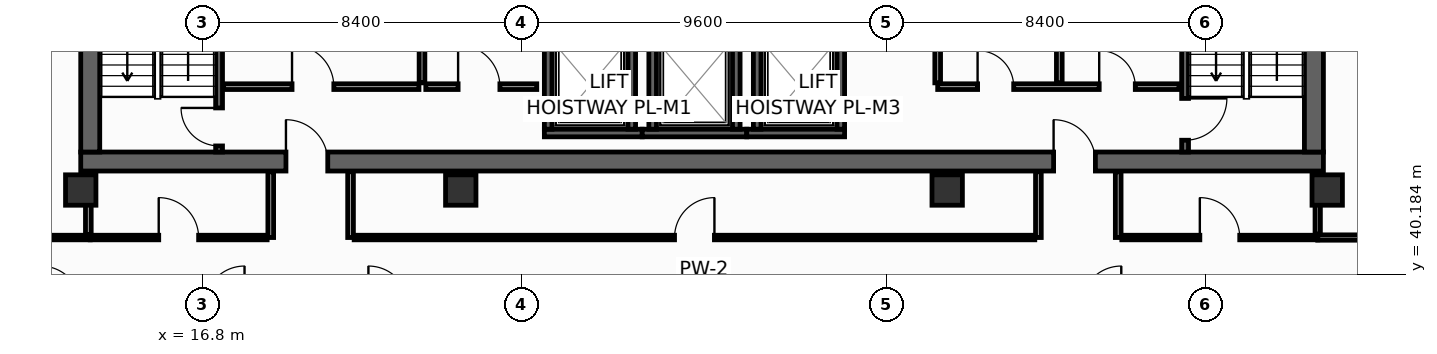
"""IFC4 building model, lengths in metres.
Left out: names, types, materials, properties, quantities, classifications, styles, units other than length and angle.
Written with IfcOpenShell. Run it as: python <this file> out.ifc"""

import sys

from ifc_helpers import new_model, si_unit, direction, frame, frame_2d, origin, origin_2d, place, context, subcontext, project, spatial, rectangle, hollow_rectangle, extrude, element, fill, save


model = new_model("IFC4")
c1 = context("Model", 3, precision=1e-05, world=origin(), true_north=direction((0.0, 1.0)))
c2 = subcontext(c1, "Body", "Model", "MODEL_VIEW")
j1 = project(units=[si_unit("LENGTHUNIT", "METRE"), si_unit("PLANEANGLEUNIT", "RADIAN")], contexts=[c1])
p1 = place(None, origin())
s1 = spatial("IfcSite", under=j1, at=p1, CompositionType="ELEMENT")
p2 = place(p1, origin())
s2 = spatial("IfcBuilding", under=s1, at=p2, CompositionType="ELEMENT")
p3 = place(p2, frame((0.0, 0.0, 194.2)))
s3 = spatial("IfcBuildingStorey", under=s2, at=p3, CompositionType="ELEMENT", Elevation=194.2)
p4 = place(p3, frame((13.6, 43.15, 0.0), z_axis=(0.0, 0.0, 1.0), x_axis=(1.0, 0.0, 0.0)))
e1 = element("IfcWall", 1, at=p4, inside=s3, PredefinedType="SHEAR", context=c2, shape_type="SweptSolid", body=[
    extrude(rectangle(XDim=32.7, YDim=0.5, at=frame_2d((16.35, 0.0))), origin(), (0.0, 0.0, 1.0), 3.55),
])
p5 = place(p4, frame((5.4, 0.0, 0.0)))
e2 = element("IfcOpeningElement", 2, at=p5, cuts=e1, PredefinedType="OPENING", context=c2, shape_type="SweptSolid", body=[
    extrude(rectangle(XDim=1.1, YDim=2.15, at=frame_2d((0.55, 1.075))), frame((0.0, 0.26, 0.0), z_axis=(0.0, -1.0, 0.0), x_axis=(1.0, 0.0, 0.0)), (0.0, 0.0, 1.0), 0.52),
])
p6 = place(p4, frame((25.6, 0.0, 0.0)))
e3 = element("IfcOpeningElement", 3, at=p6, cuts=e1, PredefinedType="OPENING", context=c2, shape_type="SweptSolid", body=[
    extrude(rectangle(XDim=1.1, YDim=2.15, at=frame_2d((0.55, 1.075))), frame((0.0, 0.26, 0.0), z_axis=(0.0, -1.0, 0.0), x_axis=(1.0, 0.0, 0.0)), (0.0, 0.0, 1.0), 0.52),
])
for number, where, z_axis, x_axis in (
    (4, (13.85, 43.4, 0.0), (0.0, 0.0, 1.0), (0.0, 1.0, 0.0)),
    (5, (46.05, 43.4, 0.0), (0.0, 0.0, 1.0), (0.0, 1.0, 0.0)),
):
    element("IfcWall", number, at=place(p3, frame(where, z_axis=z_axis, x_axis=x_axis)), inside=s3, PredefinedType="SHEAR", context=c2, shape_type="SweptSolid", body=[
        extrude(rectangle(XDim=10.4, YDim=0.5, at=frame_2d((5.2, 0.0))), origin(), (0.0, 0.0, 1.0), 3.55),
    ])
for number, where, z_axis, x_axis in (
    (6, (13.6, 42.4, 0.0), (0.0, 0.0, 1.0), (1.0, 0.0, 0.0)),
    (7, (23.6, 42.4, 0.0), (0.0, 0.0, 1.0), (1.0, 0.0, 0.0)),
    (8, (36.4, 42.4, 0.0), (0.0, 0.0, 1.0), (1.0, 0.0, 0.0)),
    (9, (46.4, 42.4, 0.0), (0.0, 0.0, 1.0), (1.0, 0.0, 0.0)),
):
    element("IfcColumn", number, at=place(p3, frame(where, z_axis=z_axis, x_axis=x_axis)), inside=s3, PredefinedType="COLUMN", context=c2, shape_type="SweptSolid", body=[
        extrude(hollow_rectangle(XDim=0.8, YDim=0.8, WallThickness=0.036, at=origin_2d()), origin(), (0.0, 0.0, 1.0), 3.8),
    ])
p7 = place(p3, frame((25.8, 43.9, 0.0), z_axis=(0.0, 0.0, 1.0), x_axis=(1.0, 0.0, 0.0)))
e10 = element("IfcWall", 10, at=p7, inside=s3, PredefinedType="SHEAR", context=c2, shape_type="SweptSolid", body=[
    extrude(rectangle(XDim=2.575, YDim=0.2, at=frame_2d((1.288, 0.0))), origin(), (0.0, 0.0, 1.0), 3.55),
])
for number, where, z_axis, x_axis in (
    (11, (25.9, 44.0, 0.0), (0.0, 0.0, 1.0), (0.0, 1.0, 0.0)),
    (12, (28.1, 44.0, 0.0), (0.0, 0.0, 1.0), (0.0, 1.0, 0.0)),
):
    element("IfcWall", number, at=place(p3, frame(where, z_axis=z_axis, x_axis=x_axis)), inside=s3, PredefinedType="SHEAR", context=c2, shape_type="SweptSolid", body=[
        extrude(rectangle(XDim=2.3, YDim=0.2, at=frame_2d((1.15, 0.0))), origin(), (0.0, 0.0, 1.0), 3.55),
    ])
p8 = place(p3, frame((28.375, 43.9, 0.0), z_axis=(0.0, 0.0, 1.0), x_axis=(1.0, 0.0, 0.0)))
e13 = element("IfcWall", 13, at=p8, inside=s3, PredefinedType="SHEAR", context=c2, shape_type="SweptSolid", body=[
    extrude(rectangle(XDim=2.75, YDim=0.2, at=frame_2d((1.375, 0.0))), origin(), (0.0, 0.0, 1.0), 3.55),
])
for number, where, z_axis, x_axis in (
    (14, (28.65, 44.0, 0.0), (0.0, 0.0, 1.0), (0.0, 1.0, 0.0)),
    (15, (30.85, 44.0, 0.0), (0.0, 0.0, 1.0), (0.0, 1.0, 0.0)),
):
    element("IfcWall", number, at=place(p3, frame(where, z_axis=z_axis, x_axis=x_axis)), inside=s3, PredefinedType="SHEAR", context=c2, shape_type="SweptSolid", body=[
        extrude(rectangle(XDim=2.3, YDim=0.2, at=frame_2d((1.15, 0.0))), origin(), (0.0, 0.0, 1.0), 3.55),
    ])
p9 = place(p3, frame((31.125, 43.9, 0.0), z_axis=(0.0, 0.0, 1.0), x_axis=(1.0, 0.0, 0.0)))
e16 = element("IfcWall", 16, at=p9, inside=s3, PredefinedType="SHEAR", context=c2, shape_type="SweptSolid", body=[
    extrude(rectangle(XDim=2.575, YDim=0.2, at=frame_2d((1.288, 0.0))), origin(), (0.0, 0.0, 1.0), 3.55),
])
for number, where, z_axis, x_axis in (
    (17, (31.4, 44.0, 0.0), (0.0, 0.0, 1.0), (0.0, 1.0, 0.0)),
    (18, (33.6, 44.0, 0.0), (0.0, 0.0, 1.0), (0.0, 1.0, 0.0)),
):
    element("IfcWall", number, at=place(p3, frame(where, z_axis=z_axis, x_axis=x_axis)), inside=s3, PredefinedType="SHEAR", context=c2, shape_type="SweptSolid", body=[
        extrude(rectangle(XDim=2.3, YDim=0.2, at=frame_2d((1.15, 0.0))), origin(), (0.0, 0.0, 1.0), 3.55),
    ])
p10 = place(p3, frame((17.24, 43.4, 0.0), z_axis=(0.0, 0.0, 1.0), x_axis=(0.0, 1.0, 0.0)))
e19 = element("IfcWall", 19, at=p10, inside=s3, PredefinedType="SHEAR", context=c2, shape_type="SweptSolid", body=[
    extrude(rectangle(XDim=10.4, YDim=0.18, at=frame_2d((5.2, 0.0))), origin(), (0.0, 0.0, 1.0), 3.55),
])
p11 = place(p10, frame((0.16, 0.0, 0.0)))
e20 = element("IfcOpeningElement", 20, at=p11, cuts=e19, PredefinedType="OPENING", context=c2, shape_type="SweptSolid", body=[
    extrude(rectangle(XDim=1.0, YDim=2.15, at=frame_2d((0.5, 1.075))), frame((0.0, 0.1, 0.0), z_axis=(0.0, -1.0, 0.0), x_axis=(1.0, 0.0, 0.0)), (0.0, 0.0, 1.0), 0.2),
])
p12 = place(p3, frame((42.66, 53.8, 0.0), z_axis=(0.0, 0.0, 1.0), x_axis=(0.0, -1.0, 0.0)))
e21 = element("IfcWall", 21, at=p12, inside=s3, PredefinedType="SHEAR", context=c2, shape_type="SweptSolid", body=[
    extrude(rectangle(XDim=10.4, YDim=0.18, at=frame_2d((5.2, 0.0))), origin(), (0.0, 0.0, 1.0), 3.55),
])
p13 = place(p12, frame((8.99, 0.0, 0.0)))
e22 = element("IfcOpeningElement", 22, at=p13, cuts=e21, PredefinedType="OPENING", context=c2, shape_type="SweptSolid", body=[
    extrude(rectangle(XDim=1.1, YDim=2.15, at=frame_2d((0.55, 1.075))), frame((0.0, 0.1, 0.0), z_axis=(0.0, -1.0, 0.0), x_axis=(1.0, 0.0, 0.0)), (0.0, 0.0, 1.0), 0.2),
])
p14 = place(p3, frame((17.36, 45.12, 0.0), z_axis=(0.0, 0.0, 1.0), x_axis=(1.0, 0.0, 0.0)))
e23 = element("IfcWall", 23, at=p14, inside=s3, PredefinedType="PARTITIONING", context=c2, shape_type="SweptSolid", body=[
    extrude(rectangle(XDim=5.14, YDim=0.15, at=frame_2d((2.57, 0.0))), origin(), (0.0, 0.0, 1.0), 3.55),
])
p15 = place(p14, frame((1.8, 0.0, 0.0)))
e24 = element("IfcOpeningElement", 24, at=p15, cuts=e23, PredefinedType="OPENING", context=c2, shape_type="SweptSolid", body=[
    extrude(rectangle(XDim=1.1, YDim=2.15, at=frame_2d((0.55, 1.075))), frame((0.0, 0.085, 0.0), z_axis=(0.0, -1.0, 0.0), x_axis=(1.0, 0.0, 0.0)), (0.0, 0.0, 1.0), 0.17),
])
p16 = place(p3, frame((22.58, 50.55, 0.0), z_axis=(0.0, 0.0, 1.0), x_axis=(0.0, -1.0, 0.0)))
e25 = element("IfcWall", 25, at=p16, inside=s3, PredefinedType="PARTITIONING", context=c2, shape_type="SweptSolid", body=[
    extrude(rectangle(XDim=5.33, YDim=0.15, at=frame_2d((2.665, 0.0))), origin(), (0.0, 0.0, 1.0), 3.55),
])
p17 = place(p16, frame((1.8, 0.0, 0.0)))
e26 = element("IfcOpeningElement", 26, at=p17, cuts=e25, PredefinedType="OPENING", context=c2, shape_type="SweptSolid", body=[
    extrude(rectangle(XDim=1.1, YDim=2.15, at=frame_2d((0.55, 1.075))), frame((0.0, 0.085, 0.0), z_axis=(0.0, -1.0, 0.0), x_axis=(1.0, 0.0, 0.0)), (0.0, 0.0, 1.0), 0.17),
])
p18 = place(p3, frame((22.68, 45.12, 0.0), z_axis=(0.0, 0.0, 1.0), x_axis=(1.0, 0.0, 0.0)))
e27 = element("IfcWall", 27, at=p18, inside=s3, PredefinedType="PARTITIONING", context=c2, shape_type="SweptSolid", body=[
    extrude(rectangle(XDim=2.92, YDim=0.15, at=frame_2d((1.46, 0.0))), origin(), (0.0, 0.0, 1.0), 3.55),
])
p19 = place(p18, frame((0.85, 0.0, 0.0)))
e28 = element("IfcOpeningElement", 28, at=p19, cuts=e27, PredefinedType="OPENING", context=c2, shape_type="SweptSolid", body=[
    extrude(rectangle(XDim=1.1, YDim=2.15, at=frame_2d((0.55, 1.075))), frame((0.0, 0.085, 0.0), z_axis=(0.0, -1.0, 0.0), x_axis=(1.0, 0.0, 0.0)), (0.0, 0.0, 1.0), 0.17),
])
p20 = place(p3, frame((36.15, 45.12, 0.0), z_axis=(0.0, 0.0, 1.0), x_axis=(1.0, 0.0, 0.0)))
e29 = element("IfcWall", 29, at=p20, inside=s3, PredefinedType="PARTITIONING", context=c2, shape_type="SweptSolid", body=[
    extrude(rectangle(XDim=6.35, YDim=0.15, at=frame_2d((3.175, 0.0))), origin(), (0.0, 0.0, 1.0), 3.55),
])
p21 = place(p20, frame((1.05, 0.0, 0.0)))
e30 = element("IfcOpeningElement", 30, at=p21, cuts=e29, PredefinedType="OPENING", context=c2, shape_type="SweptSolid", body=[
    extrude(rectangle(XDim=0.95, YDim=2.15, at=frame_2d((0.475, 1.075))), frame((0.0, 0.085, 0.0), z_axis=(0.0, -1.0, 0.0), x_axis=(1.0, 0.0, 0.0)), (0.0, 0.0, 1.0), 0.17),
])
p22 = place(p20, frame((4.25, 0.0, 0.0)))
e31 = element("IfcOpeningElement", 31, at=p22, cuts=e29, PredefinedType="OPENING", context=c2, shape_type="SweptSolid", body=[
    extrude(rectangle(XDim=0.95, YDim=2.15, at=frame_2d((0.475, 1.075))), frame((0.0, 0.085, 0.0), z_axis=(0.0, -1.0, 0.0), x_axis=(1.0, 0.0, 0.0)), (0.0, 0.0, 1.0), 0.17),
])
for number, where, z_axis, x_axis in (
    (32, (36.15, 45.22, 0.0), (0.0, 0.0, 1.0), (0.0, 1.0, 0.0)),
    (33, (39.35, 45.22, 0.0), (0.0, 0.0, 1.0), (0.0, 1.0, 0.0)),
):
    element("IfcWall", number, at=place(p3, frame(where, z_axis=z_axis, x_axis=x_axis)), inside=s3, PredefinedType="PARTITIONING", context=c2, shape_type="SweptSolid", body=[
        extrude(rectangle(XDim=2.63, YDim=0.15, at=frame_2d((1.315, 0.0))), origin(), (0.0, 0.0, 1.0), 3.55),
    ])
p23 = place(p3, frame((46.15, 41.15, 0.0), z_axis=(0.0, 0.0, 1.0), x_axis=(1.0, 0.0, 0.0)))
e34 = element("IfcWall", 34, at=p23, inside=s3, PredefinedType="PARTITIONING", context=c2, shape_type="SweptSolid", body=[
    extrude(rectangle(XDim=4.05, YDim=0.14, at=frame_2d((2.025, 0.0))), origin(), (0.0, 0.0, 1.0), 3.55),
])
p24 = place(p3, frame((46.15, 41.24, 0.0), z_axis=(0.0, 0.0, 1.0), x_axis=(0.0, 1.0, 0.0)))
e35 = element("IfcWall", 35, at=p24, inside=s3, PredefinedType="PARTITIONING", context=c2, shape_type="SweptSolid", body=[
    extrude(rectangle(XDim=1.64, YDim=0.14, at=frame_2d((0.82, 0.0))), origin(), (0.0, 0.0, 1.0), 3.55),
])
p25 = place(p3, frame((11.5, 41.15, 0.0), z_axis=(0.0, 0.0, 1.0), x_axis=(1.0, 0.0, 0.0)))
e36 = element("IfcWall", 36, at=p25, inside=s3, PredefinedType="PARTITIONING", context=c2, shape_type="SweptSolid", body=[
    extrude(rectangle(XDim=2.35, YDim=0.12, at=frame_2d((1.175, 0.0))), origin(), (0.0, 0.0, 1.0), 3.55),
])
p26 = place(p3, frame((13.8, 41.23, 0.0), z_axis=(0.0, 0.0, 1.0), x_axis=(0.0, 1.0, 0.0)))
e37 = element("IfcWall", 37, at=p26, inside=s3, PredefinedType="PARTITIONING", context=c2, shape_type="SweptSolid", body=[
    extrude(rectangle(XDim=1.65, YDim=0.15, at=frame_2d((0.825, 0.0))), origin(), (0.0, 0.0, 1.0), 3.55),
])
for number, where, z_axis, x_axis in (
    (38, (18.6, 41.15, 0.0), (0.0, 0.0, 1.0), (0.0, 1.0, 0.0)),
    (39, (20.7, 41.15, 0.0), (0.0, 0.0, 1.0), (0.0, 1.0, 0.0)),
    (40, (38.8, 41.15, 0.0), (0.0, 0.0, 1.0), (0.0, 1.0, 0.0)),
    (41, (40.9, 41.15, 0.0), (0.0, 0.0, 1.0), (0.0, 1.0, 0.0)),
):
    element("IfcWall", number, at=place(p3, frame(where, z_axis=z_axis, x_axis=x_axis)), inside=s3, PredefinedType="PARTITIONING", context=c2, shape_type="SweptSolid", body=[
        extrude(rectangle(XDim=1.73, YDim=0.15, at=frame_2d((0.865, 0.0))), origin(), (0.0, 0.0, 1.0), 3.55),
    ])
p27 = place(p3, frame((13.85, 41.15, 0.0), z_axis=(0.0, 0.0, 1.0), x_axis=(1.0, 0.0, 0.0)))
e42 = element("IfcWall", 42, at=p27, inside=s3, PredefinedType="PARTITIONING", context=c2, shape_type="SweptSolid", body=[
    extrude(rectangle(XDim=4.655, YDim=0.12, at=frame_2d((2.327, 0.0))), origin(), (0.0, 0.0, 1.0), 3.55),
])
p28 = place(p27, frame((1.802, 0.0, 0.0)))
e43 = element("IfcOpeningElement", 43, at=p28, cuts=e42, PredefinedType="OPENING", context=c2, shape_type="SweptSolid", body=[
    extrude(rectangle(XDim=1.05, YDim=2.15, at=frame_2d((0.525, 1.075))), frame((0.0, 0.07, 0.0), z_axis=(0.0, -1.0, 0.0), x_axis=(1.0, 0.0, 0.0)), (0.0, 0.0, 1.0), 0.14),
])
p29 = place(p3, frame((20.795, 41.15, 0.0), z_axis=(0.0, 0.0, 1.0), x_axis=(1.0, 0.0, 0.0)))
e44 = element("IfcWall", 44, at=p29, inside=s3, PredefinedType="PARTITIONING", context=c2, shape_type="SweptSolid", body=[
    extrude(rectangle(XDim=17.91, YDim=0.12, at=frame_2d((8.955, 0.0))), origin(), (0.0, 0.0, 1.0), 2.835),
])
p30 = place(p29, frame((8.43, 0.0, 0.0)))
e45 = element("IfcOpeningElement", 45, at=p30, cuts=e44, PredefinedType="OPENING", context=c2, shape_type="SweptSolid", body=[
    extrude(rectangle(XDim=1.05, YDim=2.15, at=frame_2d((0.525, 1.075))), frame((0.0, 0.07, 0.0), z_axis=(0.0, -1.0, 0.0), x_axis=(1.0, 0.0, 0.0)), (0.0, 0.0, 1.0), 0.14),
])
p31 = place(p3, frame((40.995, 41.15, 0.0), z_axis=(0.0, 0.0, 1.0), x_axis=(1.0, 0.0, 0.0)))
e46 = element("IfcWall", 46, at=p31, inside=s3, PredefinedType="PARTITIONING", context=c2, shape_type="SweptSolid", body=[
    extrude(rectangle(XDim=5.155, YDim=0.12, at=frame_2d((2.577, 0.0))), origin(), (0.0, 0.0, 1.0), 3.55),
])
p32 = place(p31, frame((2.053, 0.0, 0.0)))
e47 = element("IfcOpeningElement", 47, at=p32, cuts=e46, PredefinedType="OPENING", context=c2, shape_type="SweptSolid", body=[
    extrude(rectangle(XDim=1.05, YDim=2.15, at=frame_2d((0.525, 1.075))), frame((0.0, 0.07, 0.0), z_axis=(0.0, -1.0, 0.0), x_axis=(1.0, 0.0, 0.0)), (0.0, 0.0, 1.0), 0.14),
])
p33 = place(p11, origin())
e48 = element("IfcDoor", 48, at=p33, inside=s3, OperationType="SINGLE_SWING_RIGHT", PredefinedType="DOOR", context=c2, shape_type="SweptSolid", body=[
    extrude(rectangle(XDim=1.0, YDim=2.15, at=frame_2d((0.5, 1.075))), frame((0.0, 0.025, 0.0), z_axis=(0.0, -1.0, 0.0), x_axis=(1.0, 0.0, 0.0)), (0.0, 0.0, 1.0), 0.05),
])
fill(e20, e48)
p34 = place(p13, origin())
e49 = element("IfcDoor", 49, at=p34, inside=s3, OperationType="SINGLE_SWING_LEFT", PredefinedType="DOOR", context=c2, shape_type="SweptSolid", body=[
    extrude(rectangle(XDim=1.1, YDim=2.15, at=frame_2d((0.55, 1.075))), frame((0.0, 0.025, 0.0), z_axis=(0.0, -1.0, 0.0), x_axis=(1.0, 0.0, 0.0)), (0.0, 0.0, 1.0), 0.05),
])
fill(e22, e49)
p35 = place(p15, origin())
e50 = element("IfcDoor", 50, at=p35, inside=s3, OperationType="SINGLE_SWING_LEFT", PredefinedType="DOOR", context=c2, shape_type="SweptSolid", body=[
    extrude(rectangle(XDim=1.1, YDim=2.15, at=frame_2d((0.55, 1.075))), frame((0.0, 0.025, 0.0), z_axis=(0.0, -1.0, 0.0), x_axis=(1.0, 0.0, 0.0)), (0.0, 0.0, 1.0), 0.05),
])
fill(e24, e50)
p36 = place(p19, origin())
e51 = element("IfcDoor", 51, at=p36, inside=s3, OperationType="SINGLE_SWING_LEFT", PredefinedType="DOOR", context=c2, shape_type="SweptSolid", body=[
    extrude(rectangle(XDim=1.1, YDim=2.15, at=frame_2d((0.55, 1.075))), frame((0.0, 0.025, 0.0), z_axis=(0.0, -1.0, 0.0), x_axis=(1.0, 0.0, 0.0)), (0.0, 0.0, 1.0), 0.05),
])
fill(e28, e51)
p37 = place(p5, origin())
e52 = element("IfcDoor", 52, at=p37, inside=s3, OperationType="SINGLE_SWING_LEFT", PredefinedType="DOOR", context=c2, shape_type="SweptSolid", body=[
    extrude(rectangle(XDim=1.1, YDim=2.15, at=frame_2d((0.55, 1.075))), frame((0.0, 0.025, 0.0), z_axis=(0.0, -1.0, 0.0), x_axis=(1.0, 0.0, 0.0)), (0.0, 0.0, 1.0), 0.05),
])
fill(e2, e52)
p38 = place(p6, origin())
e53 = element("IfcDoor", 53, at=p38, inside=s3, OperationType="SINGLE_SWING_LEFT", PredefinedType="DOOR", context=c2, shape_type="SweptSolid", body=[
    extrude(rectangle(XDim=1.1, YDim=2.15, at=frame_2d((0.55, 1.075))), frame((0.0, 0.025, 0.0), z_axis=(0.0, -1.0, 0.0), x_axis=(1.0, 0.0, 0.0)), (0.0, 0.0, 1.0), 0.05),
])
fill(e3, e53)
p39 = place(p21, origin())
e54 = element("IfcDoor", 54, at=p39, inside=s3, OperationType="SINGLE_SWING_LEFT", PredefinedType="DOOR", context=c2, shape_type="SweptSolid", body=[
    extrude(rectangle(XDim=0.95, YDim=2.15, at=frame_2d((0.475, 1.075))), frame((0.0, 0.025, 0.0), z_axis=(0.0, -1.0, 0.0), x_axis=(1.0, 0.0, 0.0)), (0.0, 0.0, 1.0), 0.05),
])
fill(e30, e54)
p40 = place(p22, origin())
e55 = element("IfcDoor", 55, at=p40, inside=s3, OperationType="SINGLE_SWING_LEFT", PredefinedType="DOOR", context=c2, shape_type="SweptSolid", body=[
    extrude(rectangle(XDim=0.95, YDim=2.15, at=frame_2d((0.475, 1.075))), frame((0.0, 0.025, 0.0), z_axis=(0.0, -1.0, 0.0), x_axis=(1.0, 0.0, 0.0)), (0.0, 0.0, 1.0), 0.05),
])
fill(e31, e55)
p41 = place(p28, origin())
e56 = element("IfcDoor", 56, at=p41, inside=s3, OperationType="SINGLE_SWING_LEFT", PredefinedType="DOOR", context=c2, shape_type="SweptSolid", body=[
    extrude(rectangle(XDim=1.05, YDim=2.15, at=frame_2d((0.525, 1.075))), frame((0.0, 0.025, 0.0), z_axis=(0.0, -1.0, 0.0), x_axis=(1.0, 0.0, 0.0)), (0.0, 0.0, 1.0), 0.05),
])
fill(e43, e56)
p42 = place(p30, origin())
e57 = element("IfcDoor", 57, at=p42, inside=s3, OperationType="SINGLE_SWING_RIGHT", PredefinedType="DOOR", context=c2, shape_type="SweptSolid", body=[
    extrude(rectangle(XDim=1.05, YDim=2.15, at=frame_2d((0.525, 1.075))), frame((0.0, 0.025, 0.0), z_axis=(0.0, -1.0, 0.0), x_axis=(1.0, 0.0, 0.0)), (0.0, 0.0, 1.0), 0.05),
])
fill(e45, e57)
p43 = place(p32, origin())
e58 = element("IfcDoor", 58, at=p43, inside=s3, OperationType="SINGLE_SWING_LEFT", PredefinedType="DOOR", context=c2, shape_type="SweptSolid", body=[
    extrude(rectangle(XDim=1.05, YDim=2.15, at=frame_2d((0.525, 1.075))), frame((0.0, 0.025, 0.0), z_axis=(0.0, -1.0, 0.0), x_axis=(1.0, 0.0, 0.0)), (0.0, 0.0, 1.0), 0.05),
])
fill(e47, e58)
save(model, sys.argv[1])
